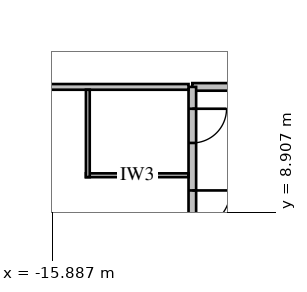
"""IFC4 building model, lengths in metres.
Left out: names, types, materials, properties, quantities, classifications, styles, units other than length and angle.
Written with IfcOpenShell. Run it as: python <this file> out.ifc"""

import sys

from ifc_helpers import new_model, si_unit, direction, frame, frame_2d, origin, place, context, subcontext, project, spatial, rectangle, extrude, element, fill, save


model = new_model("IFC4")
c1 = context("Model", 3, precision=1e-05, world=origin(), true_north=direction((0.0, 1.0)))
c2 = subcontext(c1, "Body", "Model", "MODEL_VIEW")
j1 = project(units=[si_unit("LENGTHUNIT", "METRE"), si_unit("PLANEANGLEUNIT", "RADIAN")], contexts=[c1])
p1 = place(None, origin())
s1 = spatial("IfcSite", under=j1, at=p1, CompositionType="ELEMENT")
p2 = place(p1, origin())
s2 = spatial("IfcBuilding", under=s1, at=p2, CompositionType="ELEMENT")
p3 = place(p2, frame((0.0, 0.0, 11.0)))
s3 = spatial("IfcBuildingStorey", under=s2, at=p3, CompositionType="ELEMENT", Elevation=11.0)
p4 = place(p3, frame((12.2, 12.2, 0.0), z_axis=(0.0, 0.0, 1.0), x_axis=(-1.0, 0.0, 0.0)))
e1 = element("IfcWall", 1, at=p4, inside=s3, PredefinedType="PARTITIONING", context=c2, shape_type="SweptSolid", body=[
    extrude(rectangle(XDim=24.4, YDim=0.2, at=frame_2d((12.2, 0.0))), origin(), (0.0, 0.0, 1.0), 4.272),
])
p5 = place(p4, frame((1.6, 0.0, 0.0)))
e2 = element("IfcOpeningElement", 2, at=p5, cuts=e1, PredefinedType="OPENING", context=c2, shape_type="SweptSolid", body=[
    extrude(rectangle(XDim=1.0, YDim=2.1, at=frame_2d((0.5, 1.05))), frame((0.0, 0.12, 0.0), z_axis=(0.0, -1.0, 0.0), x_axis=(1.0, 0.0, 0.0)), (0.0, 0.0, 1.0), 0.24),
])
p6 = place(p4, frame((6.14, 0.0, 0.0)))
e3 = element("IfcOpeningElement", 3, at=p6, cuts=e1, PredefinedType="OPENING", context=c2, shape_type="SweptSolid", body=[
    extrude(rectangle(XDim=1.0, YDim=2.1, at=frame_2d((0.5, 1.05))), frame((0.0, 0.12, 0.0), z_axis=(0.0, -1.0, 0.0), x_axis=(1.0, 0.0, 0.0)), (0.0, 0.0, 1.0), 0.24),
])
p7 = place(p4, frame((10.14, 0.0, 0.0)))
e4 = element("IfcOpeningElement", 4, at=p7, cuts=e1, PredefinedType="OPENING", context=c2, shape_type="SweptSolid", body=[
    extrude(rectangle(XDim=1.0, YDim=2.1, at=frame_2d((0.5, 1.05))), frame((0.0, 0.12, 0.0), z_axis=(0.0, -1.0, 0.0), x_axis=(1.0, 0.0, 0.0)), (0.0, 0.0, 1.0), 0.24),
])
p8 = place(p4, frame((17.4, 0.0, 0.0)))
e5 = element("IfcOpeningElement", 5, at=p8, cuts=e1, PredefinedType="OPENING", context=c2, shape_type="SweptSolid", body=[
    extrude(rectangle(XDim=1.8, YDim=2.4, at=frame_2d((0.9, 1.2))), frame((0.0, 0.12, 0.0), z_axis=(0.0, -1.0, 0.0), x_axis=(1.0, 0.0, 0.0)), (0.0, 0.0, 1.0), 0.24),
])
p9 = place(p3, frame((-12.2, 12.2, 0.0), z_axis=(0.0, 0.0, 1.0), x_axis=(0.0, -1.0, 0.0)))
e6 = element("IfcWall", 6, at=p9, inside=s3, PredefinedType="PARTITIONING", context=c2, shape_type="SweptSolid", body=[
    extrude(rectangle(XDim=24.4, YDim=0.2, at=frame_2d((12.2, 0.0))), origin(), (0.0, 0.0, 1.0), 4.8),
])
p10 = place(p9, frame((0.575, 0.0, 0.0)))
e7 = element("IfcOpeningElement", 7, at=p10, cuts=e6, PredefinedType="OPENING", context=c2, shape_type="SweptSolid", body=[
    extrude(rectangle(XDim=0.9, YDim=2.1, at=frame_2d((0.45, 1.05))), frame((0.0, 0.12, 0.0), z_axis=(0.0, -1.0, 0.0), x_axis=(1.0, 0.0, 0.0)), (0.0, 0.0, 1.0), 0.24),
])
p11 = place(p9, frame((2.725, 0.0, 0.0)))
e8 = element("IfcOpeningElement", 8, at=p11, cuts=e6, PredefinedType="OPENING", context=c2, shape_type="SweptSolid", body=[
    extrude(rectangle(XDim=1.0, YDim=2.1, at=frame_2d((0.5, 1.05))), frame((0.0, 0.12, 0.0), z_axis=(0.0, -1.0, 0.0), x_axis=(1.0, 0.0, 0.0)), (0.0, 0.0, 1.0), 0.24),
])
p12 = place(p9, frame((5.164, 0.0, 0.0)))
e9 = element("IfcOpeningElement", 9, at=p12, cuts=e6, PredefinedType="OPENING", context=c2, shape_type="SweptSolid", body=[
    extrude(rectangle(XDim=1.0, YDim=2.1, at=frame_2d((0.5, 1.05))), frame((0.0, 0.12, 0.0), z_axis=(0.0, -1.0, 0.0), x_axis=(1.0, 0.0, 0.0)), (0.0, 0.0, 1.0), 0.24),
])
p13 = place(p9, frame((9.164, 0.0, 0.0)))
e10 = element("IfcOpeningElement", 10, at=p13, cuts=e6, PredefinedType="OPENING", context=c2, shape_type="SweptSolid", body=[
    extrude(rectangle(XDim=1.0, YDim=2.1, at=frame_2d((0.5, 1.05))), frame((0.0, 0.12, 0.0), z_axis=(0.0, -1.0, 0.0), x_axis=(1.0, 0.0, 0.0)), (0.0, 0.0, 1.0), 0.24),
])
p14 = place(p9, frame((17.4, 0.0, 0.0)))
e11 = element("IfcOpeningElement", 11, at=p14, cuts=e6, PredefinedType="OPENING", context=c2, shape_type="SweptSolid", body=[
    extrude(rectangle(XDim=1.8, YDim=2.4, at=frame_2d((0.9, 1.2))), frame((0.0, 0.12, 0.0), z_axis=(0.0, -1.0, 0.0), x_axis=(1.0, 0.0, 0.0)), (0.0, 0.0, 1.0), 0.24),
])
p15 = place(p3, frame((-12.3, 12.2, 0.0), z_axis=(0.0, 0.0, 1.0), x_axis=(-1.0, 0.0, 0.0)))
e12 = element("IfcWall", 12, at=p15, inside=s3, PredefinedType="PARTITIONING", context=c2, shape_type="SweptSolid", body=[
    extrude(rectangle(XDim=15.55, YDim=0.15, at=frame_2d((7.775, 0.0))), origin(), (0.0, 0.0, 1.0), 4.222),
])
p16 = place(p3, frame((-12.3, 9.875, 0.0), z_axis=(0.0, 0.0, 1.0), x_axis=(-1.0, 0.0, 0.0)))
e13 = element("IfcWall", 13, at=p16, inside=s3, PredefinedType="PARTITIONING", context=c2, shape_type="SweptSolid", body=[
    extrude(rectangle(XDim=2.7, YDim=0.1, at=frame_2d((1.35, 0.0))), origin(), (0.0, 0.0, 1.0), 4.8),
])
p17 = place(p3, frame((-14.95, 12.125, 0.0), z_axis=(0.0, 0.0, 1.0), x_axis=(0.0, -1.0, 0.0)))
e14 = element("IfcWall", 14, at=p17, inside=s3, PredefinedType="PARTITIONING", context=c2, shape_type="SweptSolid", body=[
    extrude(rectangle(XDim=2.3, YDim=0.1, at=frame_2d((1.15, 0.0))), origin(), (0.0, 0.0, 1.0), 4.8),
])
p18 = place(p10, origin())
e15 = element("IfcDoor", 15, at=p18, inside=s3, OperationType="SINGLE_SWING_LEFT", PredefinedType="DOOR", context=c2, shape_type="SweptSolid", body=[
    extrude(rectangle(XDim=0.9, YDim=2.1, at=frame_2d((0.45, 1.05))), frame((0.0, 0.025, 0.0), z_axis=(0.0, -1.0, 0.0), x_axis=(1.0, 0.0, 0.0)), (0.0, 0.0, 1.0), 0.05),
])
fill(e7, e15)
p19 = place(p11, origin())
e16 = element("IfcDoor", 16, at=p19, inside=s3, OperationType="SINGLE_SWING_LEFT", PredefinedType="DOOR", context=c2, shape_type="SweptSolid", body=[
    extrude(rectangle(XDim=1.0, YDim=2.1, at=frame_2d((0.5, 1.05))), frame((0.0, 0.025, 0.0), z_axis=(0.0, -1.0, 0.0), x_axis=(1.0, 0.0, 0.0)), (0.0, 0.0, 1.0), 0.05),
])
fill(e8, e16)
save(model, sys.argv[1])
